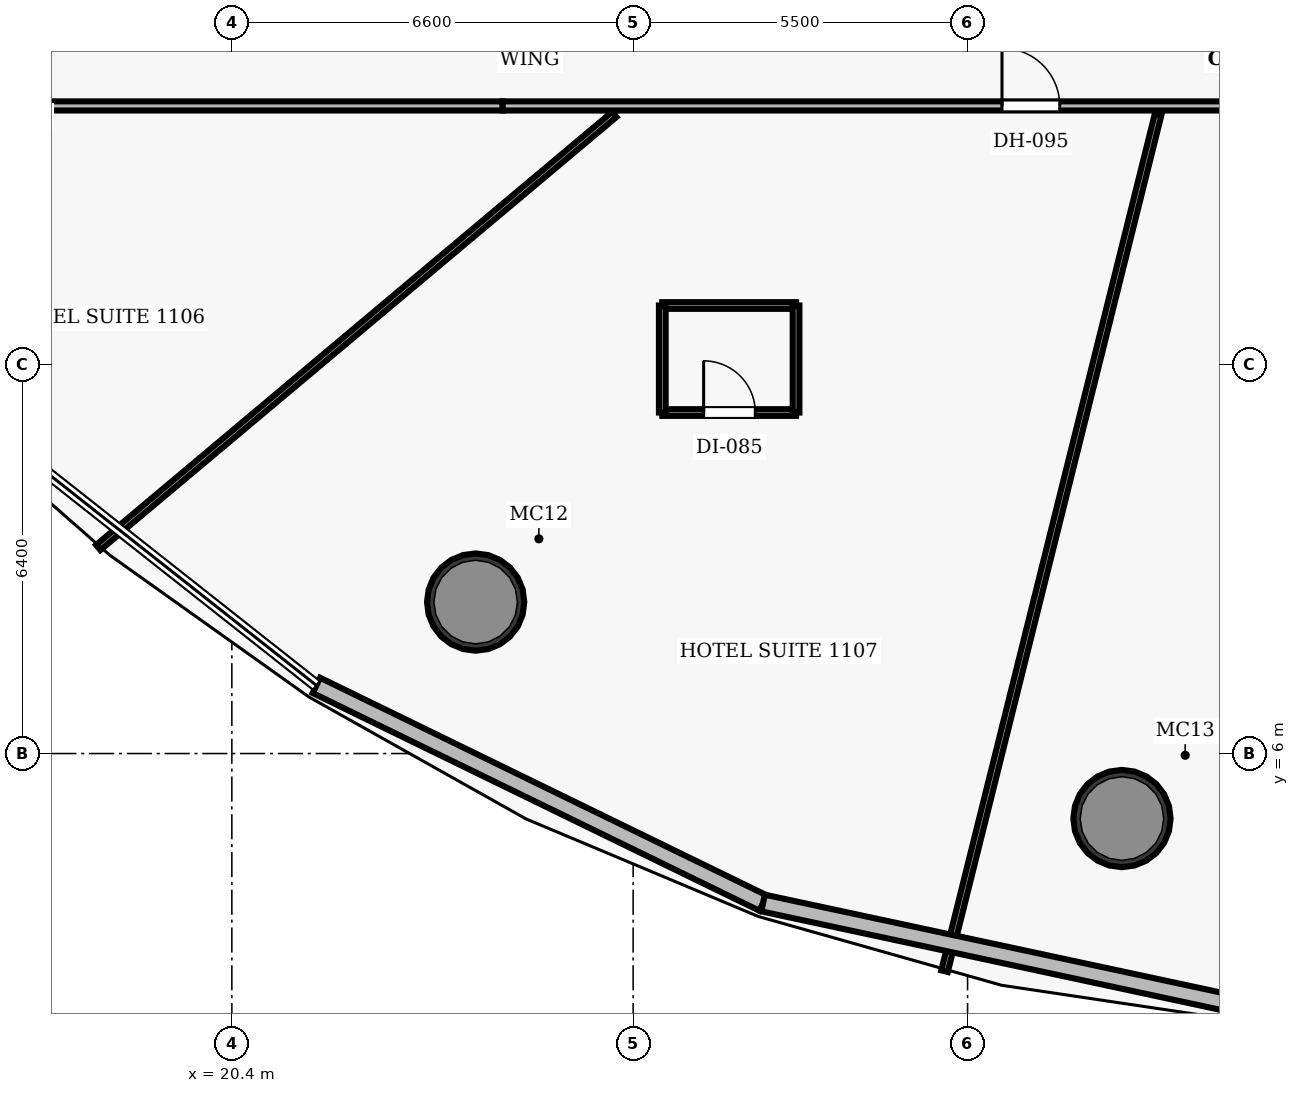
"""IFC4 building model, lengths in metres.
Left out: names, types, materials, properties, quantities, classifications, styles, units other than length and angle.
Written with IfcOpenShell. Run it as: python <this file> out.ifc"""

import sys

from ifc_helpers import new_model, si_unit, direction, frame, frame_2d, origin, origin_2d, place, context, subcontext, project, spatial, rectangle, hollow_circle, extrude, element, fill, save


model = new_model("IFC4")
c1 = context("Model", 3, precision=1e-05, world=origin(), true_north=direction((0.0, 1.0)))
c2 = subcontext(c1, "Body", "Model", "MODEL_VIEW")
j1 = project(units=[si_unit("LENGTHUNIT", "METRE"), si_unit("PLANEANGLEUNIT", "RADIAN")], contexts=[c1])
p1 = place(None, origin())
s1 = spatial("IfcSite", under=j1, at=p1, CompositionType="ELEMENT")
p2 = place(p1, origin())
s2 = spatial("IfcBuilding", under=s1, at=p2, CompositionType="ELEMENT")
p3 = place(p2, frame((0.0, 0.0, 55.4)))
s3 = spatial("IfcBuildingStorey", under=s2, at=p3, CompositionType="ELEMENT", Elevation=55.4)
for number, where, z_axis, x_axis in (
    (1, (24.41, 8.491, 0.0), (0.0, 0.0, 1.0), (1.0, 0.0, 0.0)),
    (2, (35.039, 4.931, 0.0), (0.0, 0.0, 1.0), (1.0, 0.0, 0.0)),
):
    element("IfcColumn", number, at=place(p3, frame(where, z_axis=z_axis, x_axis=x_axis)), inside=s3, PredefinedType="COLUMN", context=c2, shape_type="SweptSolid", body=[
        extrude(hollow_circle(Radius=0.8, WallThickness=0.06, at=origin_2d()), origin(), (0.0, 0.0, 1.0), 3.5),
    ])
p4 = place(p3, frame((24.85, 16.65, 0.0), z_axis=(0.0, 0.0, 1.0), x_axis=(1.0, 0.0, 0.0)))
e3 = element("IfcWall", 3, at=p4, inside=s3, PredefinedType="PARTITIONING", context=c2, shape_type="SweptSolid", body=[
    extrude(rectangle(XDim=23.5, YDim=0.15, at=frame_2d((11.75, 0.0))), origin(), (0.0, 0.0, 1.0), 2.6),
])
p5 = place(p4, frame((8.216, 0.0, 0.0)))
e4 = element("IfcOpeningElement", 4, at=p5, cuts=e3, PredefinedType="OPENING", context=c2, shape_type="SweptSolid", body=[
    extrude(rectangle(XDim=0.95, YDim=2.15, at=frame_2d((0.475, 1.075))), frame((0.0, 0.085, 0.0), z_axis=(0.0, -1.0, 0.0), x_axis=(1.0, 0.0, 0.0)), (0.0, 0.0, 1.0), 0.17),
])
p6 = place(p4, frame((15.103, 0.0, 0.0)))
e5 = element("IfcOpeningElement", 5, at=p6, cuts=e3, PredefinedType="OPENING", context=c2, shape_type="SweptSolid", body=[
    extrude(rectangle(XDim=0.95, YDim=2.15, at=frame_2d((0.475, 1.075))), frame((0.0, 0.085, 0.0), z_axis=(0.0, -1.0, 0.0), x_axis=(1.0, 0.0, 0.0)), (0.0, 0.0, 1.0), 0.17),
])
p7 = place(p4, frame((17.91, 0.0, 0.0)))
e6 = element("IfcOpeningElement", 6, at=p7, cuts=e3, PredefinedType="OPENING", context=c2, shape_type="SweptSolid", body=[
    extrude(rectangle(XDim=0.95, YDim=2.15, at=frame_2d((0.475, 1.075))), frame((0.0, 0.085, 0.0), z_axis=(0.0, -1.0, 0.0), x_axis=(1.0, 0.0, 0.0)), (0.0, 0.0, 1.0), 0.17),
])
p8 = place(p3, frame((12.494, 16.65, 0.0), z_axis=(0.0, 0.0, 1.0), x_axis=(1.0, 0.0, 0.0)))
e7 = element("IfcWall", 7, at=p8, inside=s3, PredefinedType="PARTITIONING", context=c2, shape_type="SweptSolid", body=[
    extrude(rectangle(XDim=12.356, YDim=0.15, at=frame_2d((6.178, 0.0))), origin(), (0.0, 0.0, 1.0), 2.6),
])
p9 = place(p3, frame((26.69, 16.51, 0.0), z_axis=(0.0, 0.0, 1.0), x_axis=(-0.766038579341, -0.642794597801, 0.0)))
e8 = element("IfcWall", 8, at=p9, inside=s3, PredefinedType="PARTITIONING", context=c2, shape_type="SweptSolid", body=[
    extrude(rectangle(XDim=11.08, YDim=0.11, at=frame_2d((5.54, 0.0))), origin(), (0.0, 0.0, 1.0), 2.6),
])
p10 = place(p3, frame((35.634, 16.51, 0.0), z_axis=(0.0, 0.0, 1.0), x_axis=(-0.241922353722, -0.970295612053, 0.0)))
e9 = element("IfcWall", 9, at=p10, inside=s3, PredefinedType="PARTITIONING", context=c2, shape_type="SweptSolid", body=[
    extrude(rectangle(XDim=14.52, YDim=0.11, at=frame_2d((7.26, 0.0))), origin(), (0.0, 0.0, 1.0), 2.6),
])
p11 = place(p3, frame((27.479, 11.608, 0.0), z_axis=(0.0, 0.0, 1.0), x_axis=(1.0, 0.0, 0.0)))
e10 = element("IfcWall", 10, at=p11, inside=s3, PredefinedType="PARTITIONING", context=c2, shape_type="SweptSolid", body=[
    extrude(rectangle(XDim=2.2, YDim=0.11, at=frame_2d((1.1, 0.0))), origin(), (0.0, 0.0, 1.0), 2.6),
])
p12 = place(p11, frame((0.68, 0.0, 0.0)))
e11 = element("IfcOpeningElement", 11, at=p12, cuts=e10, PredefinedType="OPENING", context=c2, shape_type="SweptSolid", body=[
    extrude(rectangle(XDim=0.85, YDim=2.1, at=frame_2d((0.425, 1.05))), frame((0.0, 0.065, 0.0), z_axis=(0.0, -1.0, 0.0), x_axis=(1.0, 0.0, 0.0)), (0.0, 0.0, 1.0), 0.13),
])
p13 = place(p3, frame((27.479, 13.368, 0.0), z_axis=(0.0, 0.0, 1.0), x_axis=(1.0, 0.0, 0.0)))
e12 = element("IfcWall", 12, at=p13, inside=s3, PredefinedType="PARTITIONING", context=c2, shape_type="SweptSolid", body=[
    extrude(rectangle(XDim=2.2, YDim=0.11, at=frame_2d((1.1, 0.0))), origin(), (0.0, 0.0, 1.0), 2.6),
])
for number, where, z_axis, x_axis in (
    (13, (27.479, 11.608, 0.0), (0.0, 0.0, 1.0), (0.0, 1.0, 0.0)),
    (14, (29.679, 11.608, 0.0), (0.0, 0.0, 1.0), (0.0, 1.0, 0.0)),
):
    element("IfcWall", number, at=place(p3, frame(where, z_axis=z_axis, x_axis=x_axis)), inside=s3, PredefinedType="PARTITIONING", context=c2, shape_type="SweptSolid", body=[
        extrude(rectangle(XDim=1.76, YDim=0.11, at=frame_2d((0.88, 0.0))), origin(), (0.0, 0.0, 1.0), 2.6),
    ])
p14 = place(p3, frame((29.136, 3.542, 0.0), z_axis=(0.0, 0.0, 1.0), x_axis=(-0.898969656807, 0.4380109087, 0.0)))
e15 = element("IfcWall", 15, at=p14, inside=s3, PredefinedType="SOLIDWALL", context=c2, shape_type="SweptSolid", body=[
    extrude(rectangle(XDim=8.171, YDim=0.28, at=frame_2d((4.085, 0.0))), origin(), (0.0, 0.0, 1.0), 3.25),
])
p15 = place(p3, frame((37.194, 1.813, 0.0), z_axis=(0.0, 0.0, 1.0), x_axis=(-0.977758173587, 0.209735438072, 0.0)))
e16 = element("IfcWall", 16, at=p15, inside=s3, PredefinedType="SOLIDWALL", context=c2, shape_type="SweptSolid", body=[
    extrude(rectangle(XDim=8.241, YDim=0.28, at=frame_2d((4.121, 0.0))), origin(), (0.0, 0.0, 1.0), 3.25),
])
p16 = place(p5, origin())
e17 = element("IfcDoor", 17, at=p16, inside=s3, OperationType="SINGLE_SWING_LEFT", PredefinedType="DOOR", context=c2, shape_type="SweptSolid", body=[
    extrude(rectangle(XDim=0.95, YDim=2.15, at=frame_2d((0.475, 1.075))), frame((0.0, 0.025, 0.0), z_axis=(0.0, -1.0, 0.0), x_axis=(1.0, 0.0, 0.0)), (0.0, 0.0, 1.0), 0.05),
])
fill(e4, e17)
p17 = place(p12, origin())
e18 = element("IfcDoor", 18, at=p17, inside=s3, OperationType="SINGLE_SWING_LEFT", PredefinedType="DOOR", context=c2, shape_type="SweptSolid", body=[
    extrude(rectangle(XDim=0.85, YDim=2.1, at=frame_2d((0.425, 1.05))), frame((0.0, 0.025, 0.0), z_axis=(0.0, -1.0, 0.0), x_axis=(1.0, 0.0, 0.0)), (0.0, 0.0, 1.0), 0.05),
])
fill(e11, e18)
save(model, sys.argv[1])
